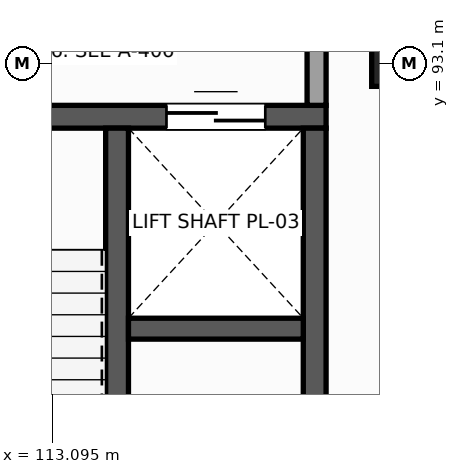
"""IFC4 building model, lengths in metres.
Left out: names, types, materials, properties, quantities, classifications, styles, units other than length and angle.
Written with IfcOpenShell. Run it as: python <this file> out.ifc"""

import sys

from ifc_helpers import new_model, si_unit, direction, frame, frame_2d, origin, origin_2d, place, context, subcontext, project, spatial, rectangle, extrude, element, fill, save


model = new_model("IFC4")
c1 = context("Model", 3, precision=1e-05, world=origin(), true_north=direction((0.0, 1.0)))
c2 = subcontext(c1, "Body", "Model", "MODEL_VIEW")
j1 = project(units=[si_unit("LENGTHUNIT", "METRE"), si_unit("PLANEANGLEUNIT", "RADIAN")], contexts=[c1])
p1 = place(None, origin())
s1 = spatial("IfcSite", under=j1, at=p1, CompositionType="ELEMENT")
p2 = place(p1, origin())
s2 = spatial("IfcBuilding", under=s1, at=p2, CompositionType="ELEMENT")
p3 = place(p2, frame((0.0, 0.0, 5.4)))
s3 = spatial("IfcBuildingStorey", under=s2, at=p3, CompositionType="ELEMENT", Elevation=5.4)
p4 = place(p3, frame((117.6, 93.1, 0.0), z_axis=(0.0, 0.0, 1.0), x_axis=(1.0, 0.0, 0.0)))
e1 = element("IfcColumn", 1, at=p4, inside=s3, PredefinedType="COLUMN", context=c2, shape_type="SweptSolid", body=[
    extrude(rectangle(XDim=0.6, YDim=0.6, at=origin_2d()), origin(), (0.0, 0.0, 1.0), 5.4),
])
p5 = place(p3, frame((110.1, 92.4, 0.0), z_axis=(0.0, 0.0, 1.0), x_axis=(1.0, 0.0, 0.0)))
e2 = element("IfcWall", 2, at=p5, inside=s3, PredefinedType="SHEAR", context=c2, shape_type="SweptSolid", body=[
    extrude(rectangle(XDim=6.6, YDim=0.3, at=frame_2d((3.3, 0.0))), origin(), (0.0, 0.0, 1.0), 5.1),
])
p6 = place(p5, frame((1.425, 0.0, 0.0)))
e3 = element("IfcOpeningElement", 3, at=p6, cuts=e2, PredefinedType="OPENING", context=c2, shape_type="SweptSolid", body=[
    extrude(rectangle(XDim=1.15, YDim=2.2, at=frame_2d((0.575, 1.1))), frame((0.0, 0.16, 0.0), z_axis=(0.0, -1.0, 0.0), x_axis=(1.0, 0.0, 0.0)), (0.0, 0.0, 1.0), 0.32),
])
p7 = place(p5, frame((4.5, 0.0, 0.0)))
e4 = element("IfcOpeningElement", 4, at=p7, cuts=e2, PredefinedType="OPENING", context=c2, shape_type="SweptSolid", body=[
    extrude(rectangle(XDim=1.3, YDim=2.2, at=frame_2d((0.65, 1.1))), frame((0.0, 0.16, 0.0), z_axis=(0.0, -1.0, 0.0), x_axis=(1.0, 0.0, 0.0)), (0.0, 0.0, 1.0), 0.32),
])
for number, where, z_axis, x_axis in (
    (5, (116.55, 84.85, 0.0), (0.0, 0.0, 1.0), (0.0, 1.0, 0.0)),
    (6, (113.95, 84.85, 0.0), (0.0, 0.0, 1.0), (0.0, 1.0, 0.0)),
):
    element("IfcWall", number, at=place(p3, frame(where, z_axis=z_axis, x_axis=x_axis)), inside=s3, PredefinedType="SHEAR", context=c2, shape_type="SweptSolid", body=[
        extrude(rectangle(XDim=7.4, YDim=0.3, at=frame_2d((3.7, 0.0))), origin(), (0.0, 0.0, 1.0), 5.1),
    ])
p8 = place(p3, frame((114.1, 89.612, 0.0), z_axis=(0.0, 0.0, 1.0), x_axis=(1.0, 0.0, 0.0)))
e7 = element("IfcWall", 7, at=p8, inside=s3, PredefinedType="SHEAR", context=c2, shape_type="SweptSolid", body=[
    extrude(rectangle(XDim=2.3, YDim=0.275, at=frame_2d((1.15, 0.0))), origin(), (0.0, 0.0, 1.0), 5.1),
])
p9 = place(p3, frame((116.575, 92.55, 0.0), z_axis=(0.0, 0.0, 1.0), x_axis=(0.0, 1.0, 0.0)))
e8 = element("IfcWall", 8, at=p9, inside=s3, PredefinedType="PARTITIONING", context=c2, shape_type="SweptSolid", body=[
    extrude(rectangle(XDim=2.95, YDim=0.25, at=frame_2d((1.475, 0.0))), origin(), (0.0, 0.0, 1.0), 4.33),
])
p10 = place(p7, origin())
e9 = element("IfcDoor", 9, at=p10, inside=s3, OperationType="DOUBLE_DOOR_SLIDING", PredefinedType="DOOR", context=c2, shape_type="SweptSolid", body=[
    extrude(rectangle(XDim=1.3, YDim=2.2, at=frame_2d((0.65, 1.1))), frame((0.0, 0.025, 0.0), z_axis=(0.0, -1.0, 0.0), x_axis=(1.0, 0.0, 0.0)), (0.0, 0.0, 1.0), 0.05),
])
fill(e4, e9)
save(model, sys.argv[1])
